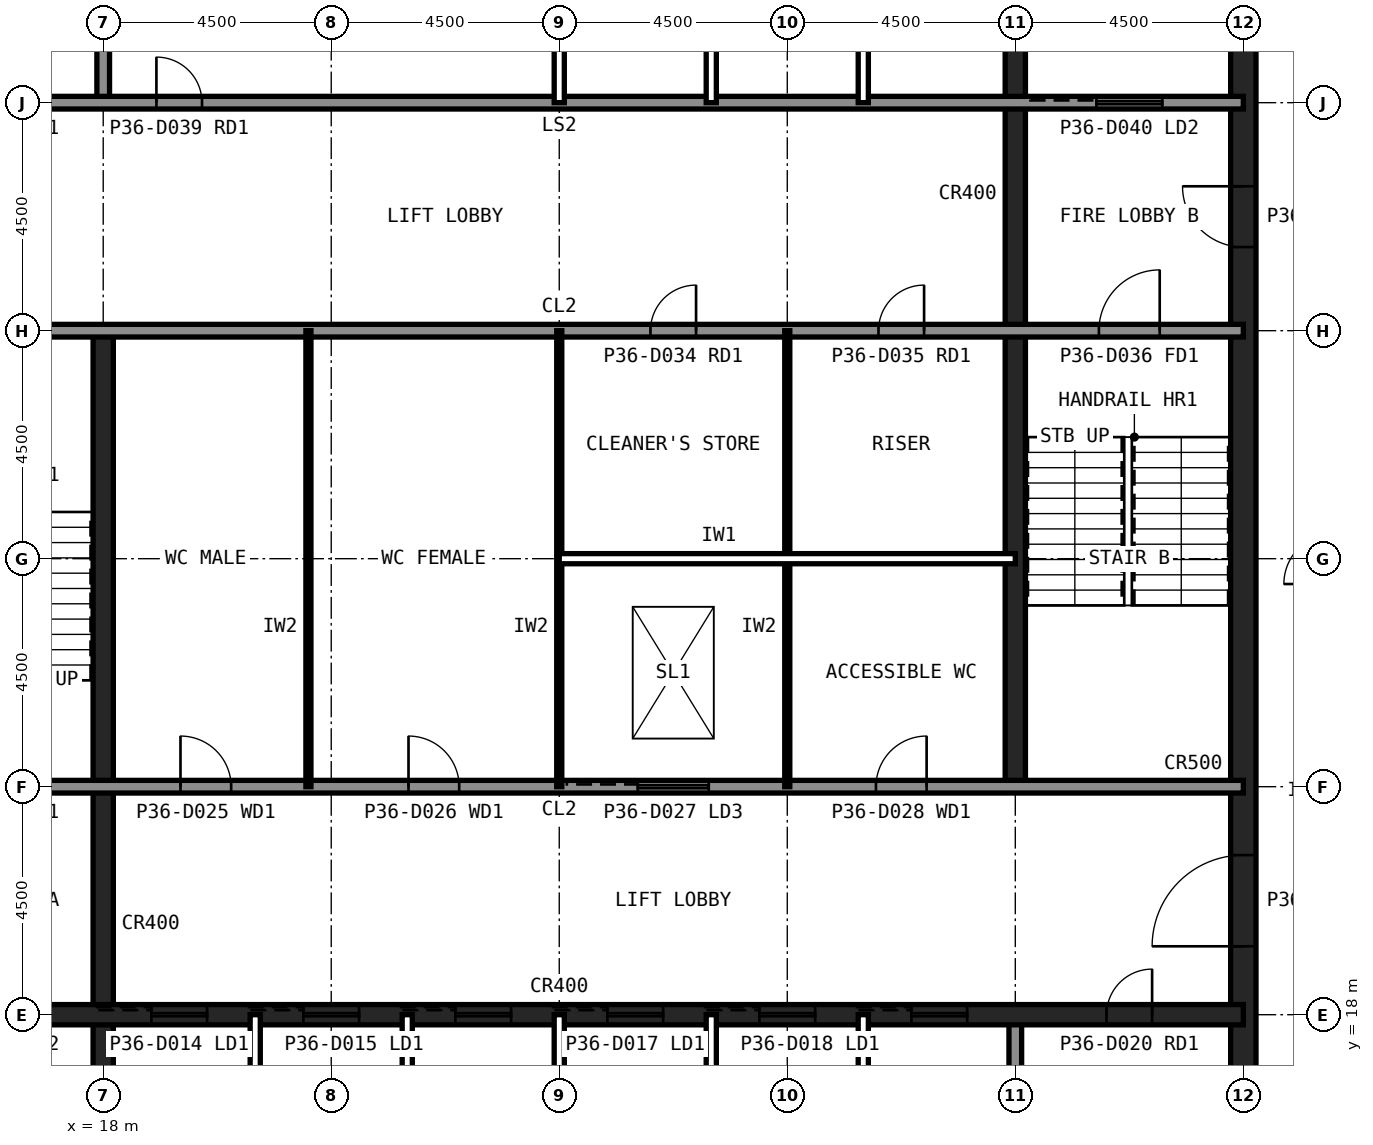
"""IFC4 building model, lengths in metres.
Left out: names, types, materials, properties, quantities, classifications, styles, units other than length and angle.
Written with IfcOpenShell. Run it as: python <this file> out.ifc"""

import sys

from ifc_helpers import new_model, si_unit, direction, frame, frame_2d, origin, place, context, subcontext, project, spatial, rectangle, extrude, element, fill, save


model = new_model("IFC4")
c1 = context("Model", 3, precision=1e-05, world=origin(), true_north=direction((0.0, 1.0)))
c2 = subcontext(c1, "Body", "Model", "MODEL_VIEW")
j1 = project(units=[si_unit("LENGTHUNIT", "METRE"), si_unit("PLANEANGLEUNIT", "RADIAN")], contexts=[c1])
p1 = place(None, origin())
s1 = spatial("IfcSite", under=j1, at=p1, CompositionType="ELEMENT")
p2 = place(p1, origin())
s2 = spatial("IfcBuilding", under=s1, at=p2, CompositionType="ELEMENT")
p3 = place(p2, frame((0.0, 0.0, 151.6)))
s3 = spatial("IfcBuildingStorey", under=s2, at=p3, CompositionType="ELEMENT", Elevation=151.6)
p4 = place(p3, frame((40.5, 13.5, 0.0), z_axis=(0.0, 0.0, 1.0), x_axis=(0.0, 1.0, 0.0)))
e1 = element("IfcWall", 1, at=p4, inside=s3, PredefinedType="SHEAR", context=c2, shape_type="SweptSolid", body=[
    extrude(rectangle(XDim=27.0, YDim=0.5, at=frame_2d((13.5, 0.0))), origin(), (0.0, 0.0, 1.0), 4.0),
])
p5 = place(p4, frame((5.85, 0.0, 0.0)))
e2 = element("IfcOpeningElement", 2, at=p5, cuts=e1, PredefinedType="OPENING", context=c2, shape_type="SweptSolid", body=[
    extrude(rectangle(XDim=1.8, YDim=2.1, at=frame_2d((0.9, 1.05))), frame((0.0, 0.26, 0.0), z_axis=(0.0, -1.0, 0.0), x_axis=(1.0, 0.0, 0.0)), (0.0, 0.0, 1.0), 0.52),
])
p6 = place(p4, frame((19.65, 0.0, 0.0)))
e3 = element("IfcOpeningElement", 3, at=p6, cuts=e1, PredefinedType="OPENING", context=c2, shape_type="SweptSolid", body=[
    extrude(rectangle(XDim=1.2, YDim=2.1, at=frame_2d((0.6, 1.05))), frame((0.0, 0.26, 0.0), z_axis=(0.0, -1.0, 0.0), x_axis=(1.0, 0.0, 0.0)), (0.0, 0.0, 1.0), 0.52),
])
p7 = place(p3, frame((18.0, 13.5, 0.0), z_axis=(0.0, 0.0, 1.0), x_axis=(0.0, 1.0, 0.0)))
e4 = element("IfcWall", 4, at=p7, inside=s3, PredefinedType="SHEAR", context=c2, shape_type="SweptSolid", body=[
    extrude(rectangle(XDim=18.0, YDim=0.4, at=frame_2d((9.0, 0.0))), origin(), (0.0, 0.0, 1.0), 4.0),
])
for number, where, z_axis, x_axis in (
    (5, (18.0, 36.0, 0.0), (0.0, 0.0, 1.0), (0.0, 1.0, 0.0)),
    (6, (36.0, 13.5, 0.0), (0.0, 0.0, 1.0), (0.0, 1.0, 0.0)),
):
    element("IfcWall", number, at=place(p3, frame(where, z_axis=z_axis, x_axis=x_axis)), inside=s3, PredefinedType="SOLIDWALL", context=c2, shape_type="SweptSolid", body=[
        extrude(rectangle(XDim=4.5, YDim=0.25, at=frame_2d((2.25, 0.0))), origin(), (0.0, 0.0, 1.0), 3.84),
    ])
p8 = place(p3, frame((36.0, 22.5, 0.0), z_axis=(0.0, 0.0, 1.0), x_axis=(0.0, 1.0, 0.0)))
e7 = element("IfcWall", 7, at=p8, inside=s3, PredefinedType="SHEAR", context=c2, shape_type="SweptSolid", body=[
    extrude(rectangle(XDim=18.0, YDim=0.4, at=frame_2d((9.0, 0.0))), origin(), (0.0, 0.0, 1.0), 4.0),
])
p9 = place(p3, frame((13.5, 18.0, 0.0), z_axis=(0.0, 0.0, 1.0), x_axis=(1.0, 0.0, 0.0)))
e8 = element("IfcWall", 8, at=p9, inside=s3, PredefinedType="SHEAR", context=c2, shape_type="SweptSolid", body=[
    extrude(rectangle(XDim=27.0, YDim=0.4, at=frame_2d((13.5, 0.0))), origin(), (0.0, 0.0, 1.0), 4.0),
])
p10 = place(p9, frame((24.3, 0.0, 0.0)))
e9 = element("IfcOpeningElement", 9, at=p10, cuts=e8, PredefinedType="OPENING", context=c2, shape_type="SweptSolid", body=[
    extrude(rectangle(XDim=0.9, YDim=2.1, at=frame_2d((0.45, 1.05))), frame((0.0, 0.21, 0.0), z_axis=(0.0, -1.0, 0.0), x_axis=(1.0, 0.0, 0.0)), (0.0, 0.0, 1.0), 0.42),
])
p11 = place(p9, frame((5.45, 0.0, 0.0)))
e10 = element("IfcOpeningElement", 10, at=p11, cuts=e8, PredefinedType="OPENING", context=c2, shape_type="SweptSolid", body=[
    extrude(rectangle(XDim=1.1, YDim=2.1, at=frame_2d((0.55, 1.05))), frame((0.0, 0.21, 0.0), z_axis=(0.0, -1.0, 0.0), x_axis=(1.0, 0.0, 0.0)), (0.0, 0.0, 1.0), 0.42),
])
p12 = place(p9, frame((8.45, 0.0, 0.0)))
e11 = element("IfcOpeningElement", 11, at=p12, cuts=e8, PredefinedType="OPENING", context=c2, shape_type="SweptSolid", body=[
    extrude(rectangle(XDim=1.1, YDim=2.1, at=frame_2d((0.55, 1.05))), frame((0.0, 0.21, 0.0), z_axis=(0.0, -1.0, 0.0), x_axis=(1.0, 0.0, 0.0)), (0.0, 0.0, 1.0), 0.42),
])
p13 = place(p9, frame((11.45, 0.0, 0.0)))
e12 = element("IfcOpeningElement", 12, at=p13, cuts=e8, PredefinedType="OPENING", context=c2, shape_type="SweptSolid", body=[
    extrude(rectangle(XDim=1.1, YDim=2.1, at=frame_2d((0.55, 1.05))), frame((0.0, 0.21, 0.0), z_axis=(0.0, -1.0, 0.0), x_axis=(1.0, 0.0, 0.0)), (0.0, 0.0, 1.0), 0.42),
])
p14 = place(p9, frame((14.45, 0.0, 0.0)))
e13 = element("IfcOpeningElement", 13, at=p14, cuts=e8, PredefinedType="OPENING", context=c2, shape_type="SweptSolid", body=[
    extrude(rectangle(XDim=1.1, YDim=2.1, at=frame_2d((0.55, 1.05))), frame((0.0, 0.21, 0.0), z_axis=(0.0, -1.0, 0.0), x_axis=(1.0, 0.0, 0.0)), (0.0, 0.0, 1.0), 0.42),
])
p15 = place(p9, frame((17.45, 0.0, 0.0)))
e14 = element("IfcOpeningElement", 14, at=p15, cuts=e8, PredefinedType="OPENING", context=c2, shape_type="SweptSolid", body=[
    extrude(rectangle(XDim=1.1, YDim=2.1, at=frame_2d((0.55, 1.05))), frame((0.0, 0.21, 0.0), z_axis=(0.0, -1.0, 0.0), x_axis=(1.0, 0.0, 0.0)), (0.0, 0.0, 1.0), 0.42),
])
p16 = place(p9, frame((20.45, 0.0, 0.0)))
e15 = element("IfcOpeningElement", 15, at=p16, cuts=e8, PredefinedType="OPENING", context=c2, shape_type="SweptSolid", body=[
    extrude(rectangle(XDim=1.1, YDim=2.1, at=frame_2d((0.55, 1.05))), frame((0.0, 0.21, 0.0), z_axis=(0.0, -1.0, 0.0), x_axis=(1.0, 0.0, 0.0)), (0.0, 0.0, 1.0), 0.42),
])
p17 = place(p9, frame((1.6, 0.0, 0.0)))
e16 = element("IfcOpeningElement", 16, at=p17, cuts=e8, PredefinedType="OPENING", context=c2, shape_type="SweptSolid", body=[
    extrude(rectangle(XDim=1.3, YDim=2.2, at=frame_2d((0.65, 1.1))), frame((0.0, 0.21, 0.0), z_axis=(0.0, -1.0, 0.0), x_axis=(1.0, 0.0, 0.0)), (0.0, 0.0, 1.0), 0.42),
])
p18 = place(p3, frame((13.5, 36.0, 0.0), z_axis=(0.0, 0.0, 1.0), x_axis=(1.0, 0.0, 0.0)))
e17 = element("IfcWall", 17, at=p18, inside=s3, PredefinedType="SOLIDWALL", context=c2, shape_type="SweptSolid", body=[
    extrude(rectangle(XDim=27.0, YDim=0.25, at=frame_2d((13.5, 0.0))), origin(), (0.0, 0.0, 1.0), 3.84),
])
p19 = place(p18, frame((1.8, 0.0, 0.0)))
e18 = element("IfcOpeningElement", 18, at=p19, cuts=e17, PredefinedType="OPENING", context=c2, shape_type="SweptSolid", body=[
    extrude(rectangle(XDim=0.9, YDim=2.1, at=frame_2d((0.45, 1.05))), frame((0.0, 0.135, 0.0), z_axis=(0.0, -1.0, 0.0), x_axis=(1.0, 0.0, 0.0)), (0.0, 0.0, 1.0), 0.27),
])
p20 = place(p18, frame((5.55, 0.0, 0.0)))
e19 = element("IfcOpeningElement", 19, at=p20, cuts=e17, PredefinedType="OPENING", context=c2, shape_type="SweptSolid", body=[
    extrude(rectangle(XDim=0.9, YDim=2.1, at=frame_2d((0.45, 1.05))), frame((0.0, 0.135, 0.0), z_axis=(0.0, -1.0, 0.0), x_axis=(1.0, 0.0, 0.0)), (0.0, 0.0, 1.0), 0.27),
])
p21 = place(p18, frame((8.55, 0.0, 0.0)))
e20 = element("IfcOpeningElement", 20, at=p21, cuts=e17, PredefinedType="OPENING", context=c2, shape_type="SweptSolid", body=[
    extrude(rectangle(XDim=0.9, YDim=2.1, at=frame_2d((0.45, 1.05))), frame((0.0, 0.135, 0.0), z_axis=(0.0, -1.0, 0.0), x_axis=(1.0, 0.0, 0.0)), (0.0, 0.0, 1.0), 0.27),
])
p22 = place(p18, frame((24.1, 0.0, 0.0)))
e21 = element("IfcOpeningElement", 21, at=p22, cuts=e17, PredefinedType="OPENING", context=c2, shape_type="SweptSolid", body=[
    extrude(rectangle(XDim=1.3, YDim=2.2, at=frame_2d((0.65, 1.1))), frame((0.0, 0.135, 0.0), z_axis=(0.0, -1.0, 0.0), x_axis=(1.0, 0.0, 0.0)), (0.0, 0.0, 1.0), 0.27),
])
p23 = place(p3, frame((13.5, 22.5, 0.0), z_axis=(0.0, 0.0, 1.0), x_axis=(1.0, 0.0, 0.0)))
e22 = element("IfcWall", 22, at=p23, inside=s3, PredefinedType="SOLIDWALL", context=c2, shape_type="SweptSolid", body=[
    extrude(rectangle(XDim=27.0, YDim=0.25, at=frame_2d((13.5, 0.0))), origin(), (0.0, 0.0, 1.0), 3.84),
])
p24 = place(p23, frame((1.65, 0.0, 0.0)))
e23 = element("IfcOpeningElement", 23, at=p24, cuts=e22, PredefinedType="OPENING", context=c2, shape_type="SweptSolid", body=[
    extrude(rectangle(XDim=1.2, YDim=2.1, at=frame_2d((0.6, 1.05))), frame((0.0, 0.135, 0.0), z_axis=(0.0, -1.0, 0.0), x_axis=(1.0, 0.0, 0.0)), (0.0, 0.0, 1.0), 0.27),
])
p25 = place(p23, frame((6.025, 0.0, 0.0)))
e24 = element("IfcOpeningElement", 24, at=p25, cuts=e22, PredefinedType="OPENING", context=c2, shape_type="SweptSolid", body=[
    extrude(rectangle(XDim=1.0, YDim=2.1, at=frame_2d((0.5, 1.05))), frame((0.0, 0.135, 0.0), z_axis=(0.0, -1.0, 0.0), x_axis=(1.0, 0.0, 0.0)), (0.0, 0.0, 1.0), 0.27),
])
p26 = place(p23, frame((10.525, 0.0, 0.0)))
e25 = element("IfcOpeningElement", 25, at=p26, cuts=e22, PredefinedType="OPENING", context=c2, shape_type="SweptSolid", body=[
    extrude(rectangle(XDim=1.0, YDim=2.1, at=frame_2d((0.5, 1.05))), frame((0.0, 0.135, 0.0), z_axis=(0.0, -1.0, 0.0), x_axis=(1.0, 0.0, 0.0)), (0.0, 0.0, 1.0), 0.27),
])
p27 = place(p23, frame((19.75, 0.0, 0.0)))
e26 = element("IfcOpeningElement", 26, at=p27, cuts=e22, PredefinedType="OPENING", context=c2, shape_type="SweptSolid", body=[
    extrude(rectangle(XDim=1.0, YDim=2.1, at=frame_2d((0.5, 1.05))), frame((0.0, 0.135, 0.0), z_axis=(0.0, -1.0, 0.0), x_axis=(1.0, 0.0, 0.0)), (0.0, 0.0, 1.0), 0.27),
])
p28 = place(p23, frame((15.05, 0.0, 0.0)))
e27 = element("IfcOpeningElement", 27, at=p28, cuts=e22, PredefinedType="OPENING", context=c2, shape_type="SweptSolid", body=[
    extrude(rectangle(XDim=1.4, YDim=2.4, at=frame_2d((0.7, 1.2))), frame((0.0, 0.135, 0.0), z_axis=(0.0, -1.0, 0.0), x_axis=(1.0, 0.0, 0.0)), (0.0, 0.0, 1.0), 0.27),
])
p29 = place(p3, frame((13.5, 31.5, 0.0), z_axis=(0.0, 0.0, 1.0), x_axis=(1.0, 0.0, 0.0)))
e28 = element("IfcWall", 28, at=p29, inside=s3, PredefinedType="SOLIDWALL", context=c2, shape_type="SweptSolid", body=[
    extrude(rectangle(XDim=27.0, YDim=0.25, at=frame_2d((13.5, 0.0))), origin(), (0.0, 0.0, 1.0), 3.84),
])
p30 = place(p29, frame((24.15, 0.0, 0.0)))
e29 = element("IfcOpeningElement", 29, at=p30, cuts=e28, PredefinedType="OPENING", context=c2, shape_type="SweptSolid", body=[
    extrude(rectangle(XDim=1.2, YDim=2.1, at=frame_2d((0.6, 1.05))), frame((0.0, 0.135, 0.0), z_axis=(0.0, -1.0, 0.0), x_axis=(1.0, 0.0, 0.0)), (0.0, 0.0, 1.0), 0.27),
])
p31 = place(p29, frame((15.3, 0.0, 0.0)))
e30 = element("IfcOpeningElement", 30, at=p31, cuts=e28, PredefinedType="OPENING", context=c2, shape_type="SweptSolid", body=[
    extrude(rectangle(XDim=0.9, YDim=2.1, at=frame_2d((0.45, 1.05))), frame((0.0, 0.135, 0.0), z_axis=(0.0, -1.0, 0.0), x_axis=(1.0, 0.0, 0.0)), (0.0, 0.0, 1.0), 0.27),
])
p32 = place(p29, frame((19.8, 0.0, 0.0)))
e31 = element("IfcOpeningElement", 31, at=p32, cuts=e28, PredefinedType="OPENING", context=c2, shape_type="SweptSolid", body=[
    extrude(rectangle(XDim=0.9, YDim=2.1, at=frame_2d((0.45, 1.05))), frame((0.0, 0.135, 0.0), z_axis=(0.0, -1.0, 0.0), x_axis=(1.0, 0.0, 0.0)), (0.0, 0.0, 1.0), 0.27),
])
for number, where, z_axis, x_axis in (
    (32, (21.0, 13.5, 0.0), (0.0, 0.0, 1.0), (0.0, 1.0, 0.0)),
    (33, (21.0, 36.0, 0.0), (0.0, 0.0, 1.0), (0.0, 1.0, 0.0)),
    (34, (24.0, 13.5, 0.0), (0.0, 0.0, 1.0), (0.0, 1.0, 0.0)),
    (35, (27.0, 13.5, 0.0), (0.0, 0.0, 1.0), (0.0, 1.0, 0.0)),
    (36, (27.0, 36.0, 0.0), (0.0, 0.0, 1.0), (0.0, 1.0, 0.0)),
    (37, (30.0, 13.5, 0.0), (0.0, 0.0, 1.0), (0.0, 1.0, 0.0)),
    (38, (30.0, 36.0, 0.0), (0.0, 0.0, 1.0), (0.0, 1.0, 0.0)),
    (39, (33.0, 13.5, 0.0), (0.0, 0.0, 1.0), (0.0, 1.0, 0.0)),
    (40, (33.0, 36.0, 0.0), (0.0, 0.0, 1.0), (0.0, 1.0, 0.0)),
):
    element("IfcWall", number, at=place(p3, frame(where, z_axis=z_axis, x_axis=x_axis)), inside=s3, PredefinedType="PARTITIONING", context=c2, shape_type="SweptSolid", body=[
        extrude(rectangle(XDim=4.5, YDim=0.2, at=frame_2d((2.25, 0.0))), origin(), (0.0, 0.0, 1.0), 3.84),
    ])
for number, where, z_axis, x_axis in (
    (41, (22.05, 22.5, 0.0), (0.0, 0.0, 1.0), (0.0, 1.0, 0.0)),
    (42, (27.0, 22.5, 0.0), (0.0, 0.0, 1.0), (0.0, 1.0, 0.0)),
    (43, (31.5, 22.5, 0.0), (0.0, 0.0, 1.0), (0.0, 1.0, 0.0)),
):
    element("IfcWall", number, at=place(p3, frame(where, z_axis=z_axis, x_axis=x_axis)), inside=s3, PredefinedType="PLUMBINGWALL", context=c2, shape_type="SweptSolid", body=[
        extrude(rectangle(XDim=9.0, YDim=0.1, at=frame_2d((4.5, 0.0))), origin(), (0.0, 0.0, 1.0), 3.84),
    ])
p33 = place(p3, frame((27.0, 27.0, 0.0), z_axis=(0.0, 0.0, 1.0), x_axis=(1.0, 0.0, 0.0)))
e44 = element("IfcWall", 44, at=p33, inside=s3, PredefinedType="PARTITIONING", context=c2, shape_type="SweptSolid", body=[
    extrude(rectangle(XDim=9.0, YDim=0.2, at=frame_2d((4.5, 0.0))), origin(), (0.0, 0.0, 1.0), 3.84),
])
p34 = place(p5, origin())
e45 = element("IfcDoor", 45, at=p34, inside=s3, OperationType="SINGLE_SWING_LEFT", PredefinedType="DOOR", context=c2, shape_type="SweptSolid", body=[
    extrude(rectangle(XDim=1.8, YDim=2.1, at=frame_2d((0.9, 1.05))), frame((0.0, 0.025, 0.0), z_axis=(0.0, -1.0, 0.0), x_axis=(1.0, 0.0, 0.0)), (0.0, 0.0, 1.0), 0.05),
])
fill(e2, e45)
p35 = place(p6, origin())
e46 = element("IfcDoor", 46, at=p35, inside=s3, OperationType="SINGLE_SWING_RIGHT", PredefinedType="DOOR", context=c2, shape_type="SweptSolid", body=[
    extrude(rectangle(XDim=1.2, YDim=2.1, at=frame_2d((0.6, 1.05))), frame((0.0, 0.025, 0.0), z_axis=(0.0, -1.0, 0.0), x_axis=(1.0, 0.0, 0.0)), (0.0, 0.0, 1.0), 0.05),
])
fill(e3, e46)
p36 = place(p30, origin())
e47 = element("IfcDoor", 47, at=p36, inside=s3, OperationType="SINGLE_SWING_RIGHT", PredefinedType="DOOR", context=c2, shape_type="SweptSolid", body=[
    extrude(rectangle(XDim=1.2, YDim=2.1, at=frame_2d((0.6, 1.05))), frame((0.0, 0.025, 0.0), z_axis=(0.0, -1.0, 0.0), x_axis=(1.0, 0.0, 0.0)), (0.0, 0.0, 1.0), 0.05),
])
fill(e29, e47)
p37 = place(p25, origin())
e48 = element("IfcDoor", 48, at=p37, inside=s3, OperationType="SINGLE_SWING_LEFT", PredefinedType="DOOR", context=c2, shape_type="SweptSolid", body=[
    extrude(rectangle(XDim=1.0, YDim=2.1, at=frame_2d((0.5, 1.05))), frame((0.0, 0.025, 0.0), z_axis=(0.0, -1.0, 0.0), x_axis=(1.0, 0.0, 0.0)), (0.0, 0.0, 1.0), 0.05),
])
fill(e24, e48)
p38 = place(p26, origin())
e49 = element("IfcDoor", 49, at=p38, inside=s3, OperationType="SINGLE_SWING_LEFT", PredefinedType="DOOR", context=c2, shape_type="SweptSolid", body=[
    extrude(rectangle(XDim=1.0, YDim=2.1, at=frame_2d((0.5, 1.05))), frame((0.0, 0.025, 0.0), z_axis=(0.0, -1.0, 0.0), x_axis=(1.0, 0.0, 0.0)), (0.0, 0.0, 1.0), 0.05),
])
fill(e25, e49)
p39 = place(p27, origin())
e50 = element("IfcDoor", 50, at=p39, inside=s3, OperationType="SINGLE_SWING_RIGHT", PredefinedType="DOOR", context=c2, shape_type="SweptSolid", body=[
    extrude(rectangle(XDim=1.0, YDim=2.1, at=frame_2d((0.5, 1.05))), frame((0.0, 0.025, 0.0), z_axis=(0.0, -1.0, 0.0), x_axis=(1.0, 0.0, 0.0)), (0.0, 0.0, 1.0), 0.05),
])
fill(e26, e50)
p40 = place(p31, origin())
e51 = element("IfcDoor", 51, at=p40, inside=s3, OperationType="SINGLE_SWING_RIGHT", PredefinedType="DOOR", context=c2, shape_type="SweptSolid", body=[
    extrude(rectangle(XDim=0.9, YDim=2.1, at=frame_2d((0.45, 1.05))), frame((0.0, 0.025, 0.0), z_axis=(0.0, -1.0, 0.0), x_axis=(1.0, 0.0, 0.0)), (0.0, 0.0, 1.0), 0.05),
])
fill(e30, e51)
p41 = place(p32, origin())
e52 = element("IfcDoor", 52, at=p41, inside=s3, OperationType="SINGLE_SWING_RIGHT", PredefinedType="DOOR", context=c2, shape_type="SweptSolid", body=[
    extrude(rectangle(XDim=0.9, YDim=2.1, at=frame_2d((0.45, 1.05))), frame((0.0, 0.025, 0.0), z_axis=(0.0, -1.0, 0.0), x_axis=(1.0, 0.0, 0.0)), (0.0, 0.0, 1.0), 0.05),
])
fill(e31, e52)
p42 = place(p10, origin())
e53 = element("IfcDoor", 53, at=p42, inside=s3, OperationType="SINGLE_SWING_RIGHT", PredefinedType="DOOR", context=c2, shape_type="SweptSolid", body=[
    extrude(rectangle(XDim=0.9, YDim=2.1, at=frame_2d((0.45, 1.05))), frame((0.0, 0.025, 0.0), z_axis=(0.0, -1.0, 0.0), x_axis=(1.0, 0.0, 0.0)), (0.0, 0.0, 1.0), 0.05),
])
fill(e9, e53)
p43 = place(p20, origin())
e54 = element("IfcDoor", 54, at=p43, inside=s3, OperationType="SINGLE_SWING_LEFT", PredefinedType="DOOR", context=c2, shape_type="SweptSolid", body=[
    extrude(rectangle(XDim=0.9, YDim=2.1, at=frame_2d((0.45, 1.05))), frame((0.0, 0.025, 0.0), z_axis=(0.0, -1.0, 0.0), x_axis=(1.0, 0.0, 0.0)), (0.0, 0.0, 1.0), 0.05),
])
fill(e19, e54)
p44 = place(p21, origin())
e55 = element("IfcDoor", 55, at=p44, inside=s3, OperationType="SINGLE_SWING_LEFT", PredefinedType="DOOR", context=c2, shape_type="SweptSolid", body=[
    extrude(rectangle(XDim=0.9, YDim=2.1, at=frame_2d((0.45, 1.05))), frame((0.0, 0.025, 0.0), z_axis=(0.0, -1.0, 0.0), x_axis=(1.0, 0.0, 0.0)), (0.0, 0.0, 1.0), 0.05),
])
fill(e20, e55)
p45 = place(p11, origin())
e56 = element("IfcDoor", 56, at=p45, inside=s3, OperationType="SLIDING_TO_LEFT", PredefinedType="DOOR", context=c2, shape_type="SweptSolid", body=[
    extrude(rectangle(XDim=1.1, YDim=2.1, at=frame_2d((0.55, 1.05))), frame((0.0, 0.025, 0.0), z_axis=(0.0, -1.0, 0.0), x_axis=(1.0, 0.0, 0.0)), (0.0, 0.0, 1.0), 0.05),
])
fill(e10, e56)
p46 = place(p12, origin())
e57 = element("IfcDoor", 57, at=p46, inside=s3, OperationType="SLIDING_TO_LEFT", PredefinedType="DOOR", context=c2, shape_type="SweptSolid", body=[
    extrude(rectangle(XDim=1.1, YDim=2.1, at=frame_2d((0.55, 1.05))), frame((0.0, 0.025, 0.0), z_axis=(0.0, -1.0, 0.0), x_axis=(1.0, 0.0, 0.0)), (0.0, 0.0, 1.0), 0.05),
])
fill(e11, e57)
p47 = place(p13, origin())
e58 = element("IfcDoor", 58, at=p47, inside=s3, OperationType="SLIDING_TO_LEFT", PredefinedType="DOOR", context=c2, shape_type="SweptSolid", body=[
    extrude(rectangle(XDim=1.1, YDim=2.1, at=frame_2d((0.55, 1.05))), frame((0.0, 0.025, 0.0), z_axis=(0.0, -1.0, 0.0), x_axis=(1.0, 0.0, 0.0)), (0.0, 0.0, 1.0), 0.05),
])
fill(e12, e58)
p48 = place(p14, origin())
e59 = element("IfcDoor", 59, at=p48, inside=s3, OperationType="SLIDING_TO_LEFT", PredefinedType="DOOR", context=c2, shape_type="SweptSolid", body=[
    extrude(rectangle(XDim=1.1, YDim=2.1, at=frame_2d((0.55, 1.05))), frame((0.0, 0.025, 0.0), z_axis=(0.0, -1.0, 0.0), x_axis=(1.0, 0.0, 0.0)), (0.0, 0.0, 1.0), 0.05),
])
fill(e13, e59)
p49 = place(p15, origin())
e60 = element("IfcDoor", 60, at=p49, inside=s3, OperationType="SLIDING_TO_LEFT", PredefinedType="DOOR", context=c2, shape_type="SweptSolid", body=[
    extrude(rectangle(XDim=1.1, YDim=2.1, at=frame_2d((0.55, 1.05))), frame((0.0, 0.025, 0.0), z_axis=(0.0, -1.0, 0.0), x_axis=(1.0, 0.0, 0.0)), (0.0, 0.0, 1.0), 0.05),
])
fill(e14, e60)
p50 = place(p16, origin())
e61 = element("IfcDoor", 61, at=p50, inside=s3, OperationType="SLIDING_TO_LEFT", PredefinedType="DOOR", context=c2, shape_type="SweptSolid", body=[
    extrude(rectangle(XDim=1.1, YDim=2.1, at=frame_2d((0.55, 1.05))), frame((0.0, 0.025, 0.0), z_axis=(0.0, -1.0, 0.0), x_axis=(1.0, 0.0, 0.0)), (0.0, 0.0, 1.0), 0.05),
])
fill(e15, e61)
p51 = place(p22, origin())
e62 = element("IfcDoor", 62, at=p51, inside=s3, OperationType="SLIDING_TO_LEFT", PredefinedType="DOOR", context=c2, shape_type="SweptSolid", body=[
    extrude(rectangle(XDim=1.3, YDim=2.2, at=frame_2d((0.65, 1.1))), frame((0.0, 0.025, 0.0), z_axis=(0.0, -1.0, 0.0), x_axis=(1.0, 0.0, 0.0)), (0.0, 0.0, 1.0), 0.05),
])
fill(e21, e62)
p52 = place(p28, origin())
e63 = element("IfcDoor", 63, at=p52, inside=s3, OperationType="SLIDING_TO_LEFT", PredefinedType="DOOR", context=c2, shape_type="SweptSolid", body=[
    extrude(rectangle(XDim=1.4, YDim=2.4, at=frame_2d((0.7, 1.2))), frame((0.0, 0.025, 0.0), z_axis=(0.0, -1.0, 0.0), x_axis=(1.0, 0.0, 0.0)), (0.0, 0.0, 1.0), 0.05),
])
fill(e27, e63)
save(model, sys.argv[1])
